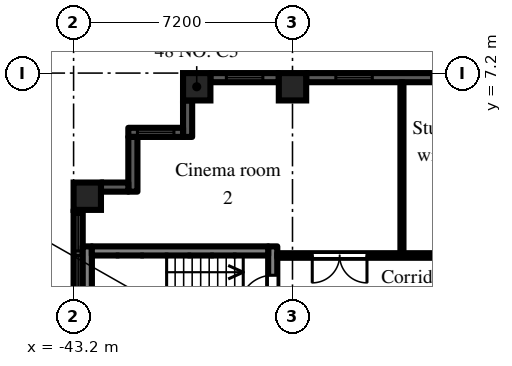
"""IFC4 building model, lengths in metres.
Left out: names, types, materials, properties, quantities, classifications, styles, units other than length and angle.
Written with IfcOpenShell. Run it as: python <this file> out.ifc"""

import sys

from ifc_helpers import new_model, si_unit, direction, frame, frame_2d, origin, origin_2d, place, context, subcontext, project, spatial, rectangle, extrude, element, fill, save


model = new_model("IFC4")
c1 = context("Model", 3, precision=1e-05, world=origin(), true_north=direction((0.0, 1.0)))
c2 = subcontext(c1, "Body", "Model", "MODEL_VIEW")
j1 = project(units=[si_unit("LENGTHUNIT", "METRE"), si_unit("PLANEANGLEUNIT", "RADIAN")], contexts=[c1])
p1 = place(None, origin())
s1 = spatial("IfcSite", under=j1, at=p1, CompositionType="ELEMENT")
p2 = place(p1, origin())
s2 = spatial("IfcBuilding", under=s1, at=p2, CompositionType="ELEMENT")
p3 = place(p2, frame((0.0, 0.0, 66.9)))
s3 = spatial("IfcBuildingStorey", under=s2, at=p3, CompositionType="ELEMENT", Elevation=66.9)
for number, where, z_axis, x_axis in (
    (1, (-42.75, 3.15, 0.0), (0.0, 0.0, 1.0), (1.0, 0.0, 0.0)),
    (2, (-39.15, 6.75, 0.0), (0.0, 0.0, 1.0), (1.0, 0.0, 0.0)),
    (3, (-36.0, 6.75, 0.0), (0.0, 0.0, 1.0), (1.0, 0.0, 0.0)),
):
    element("IfcColumn", number, at=place(p3, frame(where, z_axis=z_axis, x_axis=x_axis)), inside=s3, PredefinedType="COLUMN", context=c2, shape_type="SweptSolid", body=[
        extrude(rectangle(XDim=0.9, YDim=0.9, at=origin_2d()), origin(), (0.0, 0.0, 1.0), 3.0),
    ])
p4 = place(p3, frame((-29.25, 7.05, 0.0), z_axis=(0.0, 0.0, 1.0), x_axis=(-1.0, 0.0, 0.0)))
e4 = element("IfcWall", 4, at=p4, inside=s3, PredefinedType="SOLIDWALL", context=c2, shape_type="SweptSolid", body=[
    extrude(rectangle(XDim=6.3, YDim=0.3, at=frame_2d((3.15, 0.0))), origin(), (0.0, 0.0, 1.0), 2.1),
])
p5 = place(p4, frame((0.975, 0.0, 0.2)))
e5 = element("IfcOpeningElement", 5, at=p5, cuts=e4, PredefinedType="OPENING", context=c2, shape_type="SweptSolid", body=[
    extrude(rectangle(XDim=1.2, YDim=1.85, at=frame_2d((0.6, 0.925))), frame((0.0, 0.16, 0.0), z_axis=(0.0, -1.0, 0.0), x_axis=(1.0, 0.0, 0.0)), (0.0, 0.0, 1.0), 0.32),
])
p6 = place(p4, frame((4.125, 0.0, 0.2)))
e6 = element("IfcOpeningElement", 6, at=p6, cuts=e4, PredefinedType="OPENING", context=c2, shape_type="SweptSolid", body=[
    extrude(rectangle(XDim=1.2, YDim=1.85, at=frame_2d((0.6, 0.925))), frame((0.0, 0.16, 0.0), z_axis=(0.0, -1.0, 0.0), x_axis=(1.0, 0.0, 0.0)), (0.0, 0.0, 1.0), 0.32),
])
p7 = place(p3, frame((-36.45, 7.05, 0.0), z_axis=(0.0, 0.0, 1.0), x_axis=(-1.0, 0.0, 0.0)))
e7 = element("IfcWall", 7, at=p7, inside=s3, PredefinedType="SOLIDWALL", context=c2, shape_type="SweptSolid", body=[
    extrude(rectangle(XDim=2.25, YDim=0.3, at=frame_2d((1.125, 0.0))), origin(), (0.0, 0.0, 1.0), 2.1),
])
p8 = place(p7, frame((0.525, 0.0, 0.2)))
e8 = element("IfcOpeningElement", 8, at=p8, cuts=e7, PredefinedType="OPENING", context=c2, shape_type="SweptSolid", body=[
    extrude(rectangle(XDim=1.2, YDim=1.85, at=frame_2d((0.6, 0.925))), frame((0.0, 0.16, 0.0), z_axis=(0.0, -1.0, 0.0), x_axis=(1.0, 0.0, 0.0)), (0.0, 0.0, 1.0), 0.32),
])
p9 = place(p3, frame((-39.45, 6.3, 0.0), z_axis=(0.0, 0.0, 1.0), x_axis=(0.0, -1.0, 0.0)))
e9 = element("IfcWall", 9, at=p9, inside=s3, PredefinedType="SOLIDWALL", context=c2, shape_type="SweptSolid", body=[
    extrude(rectangle(XDim=1.2, YDim=0.3, at=frame_2d((0.6, 0.0))), origin(), (0.0, 0.0, 1.0), 2.575),
])
p10 = place(p3, frame((-39.6, 5.25, 0.0), z_axis=(0.0, 0.0, 1.0), x_axis=(-1.0, 0.0, 0.0)))
e10 = element("IfcWall", 10, at=p10, inside=s3, PredefinedType="SOLIDWALL", context=c2, shape_type="SweptSolid", body=[
    extrude(rectangle(XDim=1.8, YDim=0.3, at=frame_2d((0.9, 0.0))), origin(), (0.0, 0.0, 1.0), 2.575),
])
p11 = place(p10, frame((0.3, 0.0, 0.2)))
e11 = element("IfcOpeningElement", 11, at=p11, cuts=e10, PredefinedType="OPENING", context=c2, shape_type="SweptSolid", body=[
    extrude(rectangle(XDim=1.2, YDim=1.85, at=frame_2d((0.6, 0.925))), frame((0.0, 0.16, 0.0), z_axis=(0.0, -1.0, 0.0), x_axis=(1.0, 0.0, 0.0)), (0.0, 0.0, 1.0), 0.32),
])
p12 = place(p3, frame((-41.25, 5.1, 0.0), z_axis=(0.0, 0.0, 1.0), x_axis=(0.0, -1.0, 0.0)))
e12 = element("IfcWall", 12, at=p12, inside=s3, PredefinedType="SOLIDWALL", context=c2, shape_type="SweptSolid", body=[
    extrude(rectangle(XDim=1.8, YDim=0.3, at=frame_2d((0.9, 0.0))), origin(), (0.0, 0.0, 1.0), 2.575),
])
p13 = place(p3, frame((-41.4, 3.45, 0.0), z_axis=(0.0, 0.0, 1.0), x_axis=(-1.0, 0.0, 0.0)))
e13 = element("IfcWall", 13, at=p13, inside=s3, PredefinedType="SOLIDWALL", context=c2, shape_type="SweptSolid", body=[
    extrude(rectangle(XDim=0.9, YDim=0.3, at=frame_2d((0.45, 0.0))), origin(), (0.0, 0.0, 1.0), 2.575),
])
p14 = place(p3, frame((-43.05, 2.7, 0.0), z_axis=(0.0, 0.0, 1.0), x_axis=(0.0, -1.0, 0.0)))
e14 = element("IfcWall", 14, at=p14, inside=s3, PredefinedType="SOLIDWALL", context=c2, shape_type="SweptSolid", body=[
    extrude(rectangle(XDim=5.4, YDim=0.3, at=frame_2d((2.7, 0.0))), origin(), (0.0, 0.0, 1.0), 2.1),
])
p15 = place(p14, frame((1.5, 0.0, 0.2)))
e15 = element("IfcOpeningElement", 15, at=p15, cuts=e14, PredefinedType="OPENING", context=c2, shape_type="SweptSolid", body=[
    extrude(rectangle(XDim=2.4, YDim=1.85, at=frame_2d((1.2, 0.925))), frame((0.0, 0.16, 0.0), z_axis=(0.0, -1.0, 0.0), x_axis=(1.0, 0.0, 0.0)), (0.0, 0.0, 1.0), 0.32),
])
p16 = place(p14, frame((0.15, 0.0, 0.2)))
e16 = element("IfcOpeningElement", 16, at=p16, cuts=e14, PredefinedType="OPENING", context=c2, shape_type="SweptSolid", body=[
    extrude(rectangle(XDim=1.2, YDim=1.85, at=frame_2d((0.6, 0.925))), frame((0.0, 0.16, 0.0), z_axis=(0.0, -1.0, 0.0), x_axis=(1.0, 0.0, 0.0)), (0.0, 0.0, 1.0), 0.32),
])
p17 = place(p14, frame((4.05, 0.0, 0.2)))
e17 = element("IfcOpeningElement", 17, at=p17, cuts=e14, PredefinedType="OPENING", context=c2, shape_type="SweptSolid", body=[
    extrude(rectangle(XDim=1.2, YDim=1.85, at=frame_2d((0.6, 0.925))), frame((0.0, 0.16, 0.0), z_axis=(0.0, -1.0, 0.0), x_axis=(1.0, 0.0, 0.0)), (0.0, 0.0, 1.0), 0.32),
])
p18 = place(p3, frame((-36.65, -1.5, 0.0), z_axis=(0.0, 0.0, 1.0), x_axis=(0.0, 1.0, 0.0)))
e18 = element("IfcWall", 18, at=p18, inside=s3, PredefinedType="SHEAR", context=c2, shape_type="SweptSolid", body=[
    extrude(rectangle(XDim=3.0, YDim=0.3, at=frame_2d((1.5, 0.0))), origin(), (0.0, 0.0, 1.0), 2.575),
])
p19 = place(p18, frame((0.95, 0.0, 0.0)))
e19 = element("IfcOpeningElement", 19, at=p19, cuts=e18, PredefinedType="OPENING", context=c2, shape_type="SweptSolid", body=[
    extrude(rectangle(XDim=1.1, YDim=2.1, at=frame_2d((0.55, 1.05))), frame((0.0, 0.16, 0.0), z_axis=(0.0, -1.0, 0.0), x_axis=(1.0, 0.0, 0.0)), (0.0, 0.0, 1.0), 0.32),
])
p20 = place(p3, frame((-42.75, -1.5, 0.0), z_axis=(0.0, 0.0, 1.0), x_axis=(0.0, 1.0, 0.0)))
e20 = element("IfcWall", 20, at=p20, inside=s3, PredefinedType="SHEAR", context=c2, shape_type="SweptSolid", body=[
    extrude(rectangle(XDim=3.0, YDim=0.3, at=frame_2d((1.5, 0.0))), origin(), (0.0, 0.0, 1.0), 2.575),
])
p21 = place(p3, frame((-36.8, 1.35, 0.0), z_axis=(0.0, 0.0, 1.0), x_axis=(-1.0, 0.0, 0.0)))
e21 = element("IfcWall", 21, at=p21, inside=s3, PredefinedType="SHEAR", context=c2, shape_type="SweptSolid", body=[
    extrude(rectangle(XDim=5.8, YDim=0.3, at=frame_2d((2.9, 0.0))), origin(), (0.0, 0.0, 1.0), 2.575),
])
p22 = place(p3, frame((-36.5, 1.2, 0.0), z_axis=(0.0, 0.0, 1.0), x_axis=(1.0, 0.0, 0.0)))
e22 = element("IfcWall", 22, at=p22, inside=s3, PredefinedType="PARTITIONING", context=c2, shape_type="SweptSolid", body=[
    extrude(rectangle(XDim=14.9, YDim=0.15, at=frame_2d((7.45, 0.0))), origin(), (0.0, 0.0, 1.0), 2.575),
])
p23 = place(p22, frame((13.7, 0.0, 0.0)))
e23 = element("IfcOpeningElement", 23, at=p23, cuts=e22, PredefinedType="OPENING", context=c2, shape_type="SweptSolid", body=[
    extrude(rectangle(XDim=1.0, YDim=2.1, at=frame_2d((0.5, 1.05))), frame((0.0, 0.085, 0.0), z_axis=(0.0, -1.0, 0.0), x_axis=(1.0, 0.0, 0.0)), (0.0, 0.0, 1.0), 0.17),
])
p24 = place(p22, frame((8.19, 0.0, 0.0)))
e24 = element("IfcOpeningElement", 24, at=p24, cuts=e22, PredefinedType="OPENING", context=c2, shape_type="SweptSolid", body=[
    extrude(rectangle(XDim=1.0, YDim=2.1, at=frame_2d((0.5, 1.05))), frame((0.0, 0.085, 0.0), z_axis=(0.0, -1.0, 0.0), x_axis=(1.0, 0.0, 0.0)), (0.0, 0.0, 1.0), 0.17),
])
p25 = place(p22, frame((1.15, 0.0, 0.0)))
e25 = element("IfcOpeningElement", 25, at=p25, cuts=e22, PredefinedType="OPENING", context=c2, shape_type="SweptSolid", body=[
    extrude(rectangle(XDim=1.8, YDim=2.1, at=frame_2d((0.9, 1.05))), frame((0.0, 0.085, 0.0), z_axis=(0.0, -1.0, 0.0), x_axis=(1.0, 0.0, 0.0)), (0.0, 0.0, 1.0), 0.17),
])
p26 = place(p3, frame((-32.4, 1.275, 0.0), z_axis=(0.0, 0.0, 1.0), x_axis=(0.0, 1.0, 0.0)))
e26 = element("IfcWall", 26, at=p26, inside=s3, PredefinedType="PARTITIONING", context=c2, shape_type="SweptSolid", body=[
    extrude(rectangle(XDim=5.625, YDim=0.1, at=frame_2d((2.812, 0.0))), origin(), (0.0, 0.0, 1.0), 2.575),
])
p27 = place(p5, origin())
e27 = element("IfcWindow", 27, at=p27, inside=s3, PartitioningType="SINGLE_PANEL", PredefinedType="WINDOW", context=c2, shape_type="SweptSolid", body=[
    extrude(rectangle(XDim=1.2, YDim=1.85, at=frame_2d((0.6, 0.925))), frame((0.0, 0.03, 0.0), z_axis=(0.0, -1.0, 0.0), x_axis=(1.0, 0.0, 0.0)), (0.0, 0.0, 1.0), 0.06),
])
fill(e5, e27)
p28 = place(p6, origin())
e28 = element("IfcWindow", 28, at=p28, inside=s3, PartitioningType="SINGLE_PANEL", PredefinedType="WINDOW", context=c2, shape_type="SweptSolid", body=[
    extrude(rectangle(XDim=1.2, YDim=1.85, at=frame_2d((0.6, 0.925))), frame((0.0, 0.03, 0.0), z_axis=(0.0, -1.0, 0.0), x_axis=(1.0, 0.0, 0.0)), (0.0, 0.0, 1.0), 0.06),
])
fill(e6, e28)
p29 = place(p8, origin())
e29 = element("IfcWindow", 29, at=p29, inside=s3, PartitioningType="SINGLE_PANEL", PredefinedType="WINDOW", context=c2, shape_type="SweptSolid", body=[
    extrude(rectangle(XDim=1.2, YDim=1.85, at=frame_2d((0.6, 0.925))), frame((0.0, 0.03, 0.0), z_axis=(0.0, -1.0, 0.0), x_axis=(1.0, 0.0, 0.0)), (0.0, 0.0, 1.0), 0.06),
])
fill(e8, e29)
p30 = place(p11, origin())
e30 = element("IfcWindow", 30, at=p30, inside=s3, PartitioningType="SINGLE_PANEL", PredefinedType="WINDOW", context=c2, shape_type="SweptSolid", body=[
    extrude(rectangle(XDim=1.2, YDim=1.85, at=frame_2d((0.6, 0.925))), frame((0.0, 0.03, 0.0), z_axis=(0.0, -1.0, 0.0), x_axis=(1.0, 0.0, 0.0)), (0.0, 0.0, 1.0), 0.06),
])
fill(e11, e30)
p31 = place(p15, origin())
e31 = element("IfcWindow", 31, at=p31, inside=s3, PartitioningType="SINGLE_PANEL", PredefinedType="WINDOW", context=c2, shape_type="SweptSolid", body=[
    extrude(rectangle(XDim=2.4, YDim=1.85, at=frame_2d((1.2, 0.925))), frame((0.0, 0.03, 0.0), z_axis=(0.0, -1.0, 0.0), x_axis=(1.0, 0.0, 0.0)), (0.0, 0.0, 1.0), 0.06),
])
fill(e15, e31)
p32 = place(p16, origin())
e32 = element("IfcWindow", 32, at=p32, inside=s3, PartitioningType="SINGLE_PANEL", PredefinedType="WINDOW", context=c2, shape_type="SweptSolid", body=[
    extrude(rectangle(XDim=1.2, YDim=1.85, at=frame_2d((0.6, 0.925))), frame((0.0, 0.03, 0.0), z_axis=(0.0, -1.0, 0.0), x_axis=(1.0, 0.0, 0.0)), (0.0, 0.0, 1.0), 0.06),
])
fill(e16, e32)
p33 = place(p19, origin())
e33 = element("IfcDoor", 33, at=p33, inside=s3, OperationType="SINGLE_SWING_LEFT", PredefinedType="DOOR", context=c2, shape_type="SweptSolid", body=[
    extrude(rectangle(XDim=1.1, YDim=2.1, at=frame_2d((0.55, 1.05))), frame((0.0, 0.025, 0.0), z_axis=(0.0, -1.0, 0.0), x_axis=(1.0, 0.0, 0.0)), (0.0, 0.0, 1.0), 0.05),
])
fill(e19, e33)
p34 = place(p25, frame((1.8, 0.0, 0.0), z_axis=(0.0, 0.0, 1.0), x_axis=(-1.0, 0.0, 0.0)))
e34 = element("IfcDoor", 34, at=p34, inside=s3, OperationType="DOUBLE_DOOR_DOUBLE_SWING", PredefinedType="DOOR", context=c2, shape_type="SweptSolid", body=[
    extrude(rectangle(XDim=1.8, YDim=2.1, at=frame_2d((0.9, 1.05))), frame((0.0, 0.025, 0.0), z_axis=(0.0, -1.0, 0.0), x_axis=(1.0, 0.0, 0.0)), (0.0, 0.0, 1.0), 0.05),
])
fill(e25, e34)
save(model, sys.argv[1])
